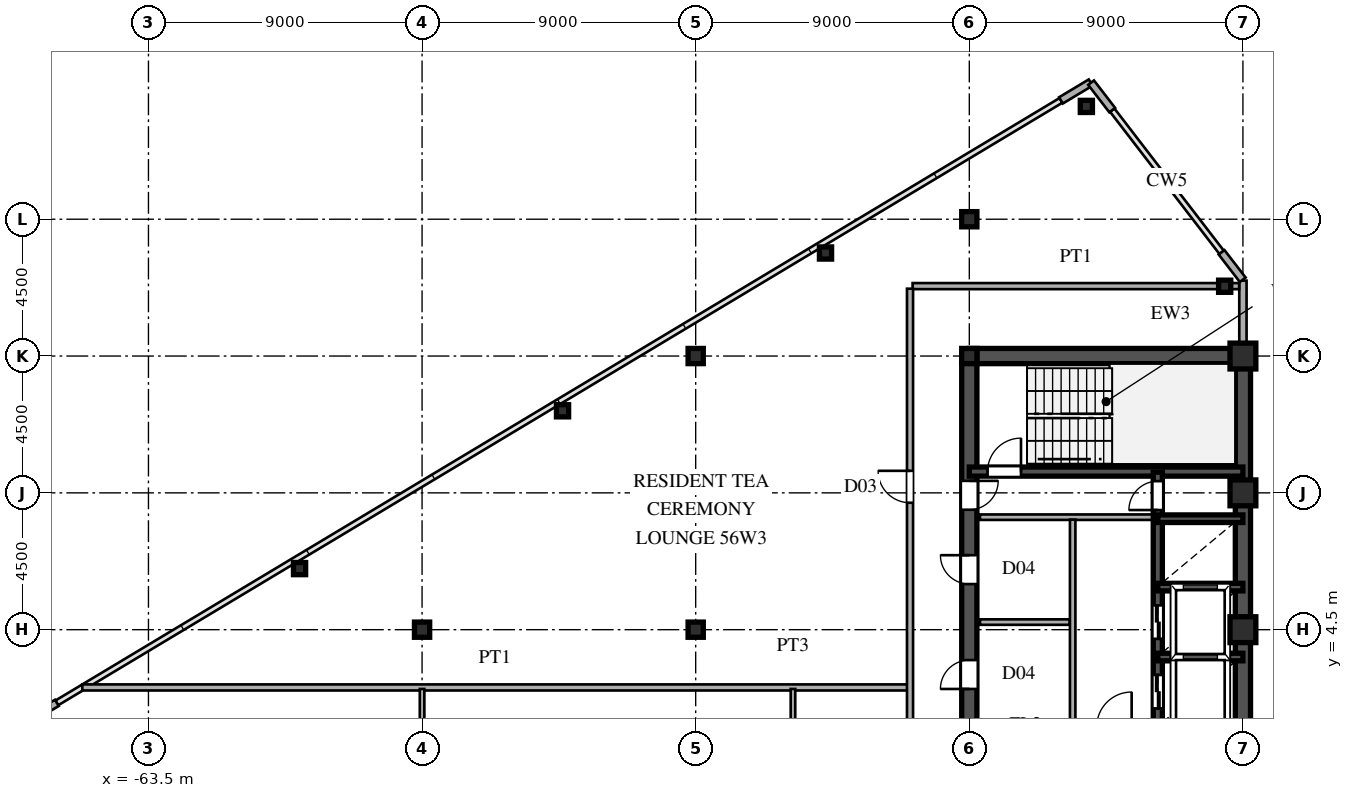
"""IFC4 building model, lengths in metres.
Left out: names, types, materials, properties, quantities, classifications, styles, units other than length and angle.
Written with IfcOpenShell. Run it as: python <this file> out.ifc"""

import sys

from ifc_helpers import new_model, si_unit, direction, frame, frame_2d, origin, origin_2d, place, context, subcontext, project, spatial, rectangle, hollow_rectangle, i_section, extrude, source, transform, mapped, element, fill, save


model = new_model("IFC4")
c1 = context("Model", 3, precision=1e-05, world=origin(), true_north=direction((0.0, 1.0)))
c2 = subcontext(c1, "Body", "Model", "MODEL_VIEW")
j1 = project(units=[si_unit("LENGTHUNIT", "METRE"), si_unit("PLANEANGLEUNIT", "RADIAN")], contexts=[c1])
p1 = place(None, origin())
s1 = spatial("IfcSite", under=j1, at=p1, CompositionType="ELEMENT")
p2 = place(p1, origin())
s2 = spatial("IfcBuilding", under=s1, at=p2, CompositionType="ELEMENT")
p3 = place(p2, frame((0.0, 0.0, 210.3)))
s3 = spatial("IfcBuildingStorey", under=s2, at=p3, CompositionType="ELEMENT", Elevation=210.3)
m1 = source(origin(), c2, "Body", "SweptSolid", [
    extrude(hollow_rectangle(XDim=0.85, YDim=0.85, WallThickness=0.036, at=origin_2d()), origin(), (0.0, 0.0, 1.0), 3.6),
])
for number, where, z_axis, x_axis in (
    (1, (-27.5, 4.5, 0.0), (0.0, 0.0, 1.0), (1.0, 0.0, 0.0)),
    (2, (-27.5, 9.0, 0.0), (0.0, 0.0, 1.0), (1.0, 0.0, 0.0)),
    (3, (-27.5, 13.5, 0.0), (0.0, 0.0, 1.0), (1.0, 0.0, 0.0)),
):
    element("IfcColumn", number, at=place(p3, frame(where, z_axis=z_axis, x_axis=x_axis)), inside=s3, PredefinedType="COLUMN", context=c2, shape_type="MappedRepresentation", body=[
        mapped(m1, transform((0.0, 0.0, 0.0), scale=1.0)),
    ])
m2 = source(origin(), c2, "Body", "SweptSolid", [
    extrude(i_section(OverallWidth=0.5, OverallDepth=0.5, WebThickness=0.02, FlangeThickness=0.032, at=origin_2d()), origin(), (0.0, 0.0, 1.0), 3.6),
])
for number, where, z_axis, x_axis in (
    (4, (-36.5, 13.5, 0.0), (0.0, 0.0, 1.0), (1.0, 0.0, 0.0)),
    (5, (-36.5, 18.0, 0.0), (0.0, 0.0, 1.0), (1.0, 0.0, 0.0)),
    (6, (-45.5, 4.5, 0.0), (0.0, 0.0, 1.0), (1.0, 0.0, 0.0)),
    (7, (-45.5, 13.5, 0.0), (0.0, 0.0, 1.0), (1.0, 0.0, 0.0)),
    (8, (-54.5, 4.5, 0.0), (0.0, 0.0, 1.0), (1.0, 0.0, 0.0)),
):
    element("IfcColumn", number, at=place(p3, frame(where, z_axis=z_axis, x_axis=x_axis)), inside=s3, PredefinedType="COLUMN", context=c2, shape_type="MappedRepresentation", body=[
        mapped(m2, transform((0.0, 0.0, 0.0), scale=1.0)),
    ])
m3 = source(origin(), c2, "Body", "SweptSolid", [
    extrude(hollow_rectangle(XDim=0.4, YDim=0.4, WallThickness=0.016, at=origin_2d()), origin(), (0.0, 0.0, 1.0), 3.6),
])
for number, where, z_axis, x_axis in (
    (9, (-28.1, 15.796, 0.0), (0.0, 0.0, 1.0), (1.0, 0.0, 0.0)),
    (10, (-32.65, 21.71, 0.0), (0.0, 0.0, 1.0), (1.0, 0.0, 0.0)),
    (11, (-41.23, 16.889, 0.0), (0.0, 0.0, 1.0), (1.0, 0.0, 0.0)),
    (12, (-49.88, 11.699, 0.0), (0.0, 0.0, 1.0), (1.0, 0.0, 0.0)),
    (13, (-58.53, 6.509, 0.0), (0.0, 0.0, 1.0), (1.0, 0.0, 0.0)),
):
    element("IfcColumn", number, at=place(p3, frame(where, z_axis=z_axis, x_axis=x_axis)), inside=s3, PredefinedType="COLUMN", context=c2, shape_type="MappedRepresentation", body=[
        mapped(m3, transform((0.0, 0.0, 0.0), scale=1.0)),
    ])
p4 = place(p3, frame((-27.5, 13.755, 0.0), z_axis=(0.0, 0.0, 1.0), x_axis=(0.0, 1.0, 0.0)))
e14 = element("IfcWall", 14, at=p4, inside=s3, PredefinedType="SOLIDWALL", context=c2, shape_type="SweptSolid", body=[
    extrude(rectangle(XDim=0.62, YDim=0.24, at=frame_2d((0.31, 0.0))), origin(), (0.0, 0.0, 1.0), 2.88),
])
p5 = place(p3, frame((-27.5, 14.375, 0.0), z_axis=(0.0, 0.0, 1.0), x_axis=(0.0, 1.0, 0.0)))
e15 = element("IfcWall", 15, at=p5, inside=s3, PredefinedType="SOLIDWALL", context=c2, shape_type="SweptSolid", body=[
    extrude(rectangle(XDim=1.605, YDim=0.24, at=frame_2d((0.803, 0.0))), origin(), (0.0, 0.0, 1.0), 3.38),
])
for number, where, z_axis, x_axis in (
    (16, (-27.506, 16.008, 0.0), (0.0, 0.0, 1.0), (-0.61, 0.793, 0.0)),
    (17, (-31.799, 21.588, 0.0), (0.0, 0.0, 1.0), (-0.61, 0.793, 0.0)),
    (18, (-32.509, 22.495, 0.0), (0.0, 0.0, 1.0), (-0.857, -0.515, 0.0)),
    (19, (-66.514, 2.092, 0.0), (0.0, 0.0, 1.0), (-0.857, -0.515, 0.0)),
):
    element("IfcWall", number, at=place(p3, frame(where, z_axis=z_axis, x_axis=x_axis)), inside=s3, PredefinedType="SOLIDWALL", context=c2, shape_type="SweptSolid", body=[
        extrude(rectangle(XDim=1.14, YDim=0.24, at=frame_2d((0.57, 0.0))), origin(), (0.0, 0.0, 1.0), 3.38),
    ])
p6 = place(p3, frame((-27.5, 1.3, 0.0), z_axis=(0.0, 0.0, 1.0), x_axis=(0.0, 1.0, 0.0)))
e20 = element("IfcWall", 20, at=p6, inside=s3, PredefinedType="SHEAR", context=c2, shape_type="SweptSolid", body=[
    extrude(rectangle(XDim=12.2, YDim=0.5, at=frame_2d((6.1, 0.0))), origin(), (0.0, 0.0, 1.0), 3.38),
])
p7 = place(p3, frame((-36.5, 13.5, 0.0), z_axis=(0.0, 0.0, 1.0), x_axis=(1.0, 0.0, 0.0)))
e21 = element("IfcWall", 21, at=p7, inside=s3, PredefinedType="SHEAR", context=c2, shape_type="SweptSolid", body=[
    extrude(rectangle(XDim=9.0, YDim=0.5, at=frame_2d((4.5, 0.0))), origin(), (0.0, 0.0, 1.0), 3.38),
])
p8 = place(p3, frame((-36.5, 8.2, 0.0), z_axis=(0.0, 0.0, 1.0), x_axis=(0.0, 1.0, 0.0)))
e22 = element("IfcWall", 22, at=p8, inside=s3, PredefinedType="SHEAR", context=c2, shape_type="SweptSolid", body=[
    extrude(rectangle(XDim=5.45, YDim=0.5, at=frame_2d((2.725, 0.0))), origin(), (0.0, 0.0, 1.0), 3.38),
])
p9 = place(p8, frame((0.245, 0.0, 0.0)))
e23 = element("IfcOpeningElement", 23, at=p9, cuts=e22, PredefinedType="OPENING", context=c2, shape_type="SweptSolid", body=[
    extrude(rectangle(XDim=0.95, YDim=2.15, at=frame_2d((0.475, 1.075))), frame((0.0, 0.26, 0.0), z_axis=(0.0, -1.0, 0.0), x_axis=(1.0, 0.0, 0.0)), (0.0, 0.0, 1.0), 0.52),
])
p10 = place(p3, frame((-36.5, 1.3, 0.0), z_axis=(0.0, 0.0, 1.0), x_axis=(0.0, 1.0, 0.0)))
e24 = element("IfcWall", 24, at=p10, inside=s3, PredefinedType="SHEAR", context=c2, shape_type="SweptSolid", body=[
    extrude(rectangle(XDim=3.45, YDim=0.5, at=frame_2d((1.725, 0.0))), origin(), (0.0, 0.0, 1.0), 3.38),
])
p11 = place(p10, frame((1.25, 0.0, 0.0)))
e25 = element("IfcOpeningElement", 25, at=p11, cuts=e24, PredefinedType="OPENING", context=c2, shape_type="SweptSolid", body=[
    extrude(rectangle(XDim=0.95, YDim=2.15, at=frame_2d((0.475, 1.075))), frame((0.0, 0.26, 0.0), z_axis=(0.0, -1.0, 0.0), x_axis=(1.0, 0.0, 0.0)), (0.0, 0.0, 1.0), 0.52),
])
p12 = place(p3, frame((-36.5, 4.75, 0.0), z_axis=(0.0, 0.0, 1.0), x_axis=(0.0, 1.0, 0.0)))
e26 = element("IfcWall", 26, at=p12, inside=s3, PredefinedType="SHEAR", context=c2, shape_type="SweptSolid", body=[
    extrude(rectangle(XDim=3.45, YDim=0.5, at=frame_2d((1.725, 0.0))), origin(), (0.0, 0.0, 1.0), 3.38),
])
p13 = place(p12, frame((1.25, 0.0, 0.0)))
e27 = element("IfcOpeningElement", 27, at=p13, cuts=e26, PredefinedType="OPENING", context=c2, shape_type="SweptSolid", body=[
    extrude(rectangle(XDim=0.95, YDim=2.15, at=frame_2d((0.475, 1.075))), frame((0.0, 0.26, 0.0), z_axis=(0.0, -1.0, 0.0), x_axis=(1.0, 0.0, 0.0)), (0.0, 0.0, 1.0), 0.52),
])
p14 = place(p3, frame((-36.5, 9.7, 0.0), z_axis=(0.0, 0.0, 1.0), x_axis=(1.0, 0.0, 0.0)))
e28 = element("IfcWall", 28, at=p14, inside=s3, PredefinedType="SHEAR", context=c2, shape_type="SweptSolid", body=[
    extrude(rectangle(XDim=9.0, YDim=0.3, at=frame_2d((4.5, 0.0))), origin(), (0.0, 0.0, 1.0), 3.38),
])
p15 = place(p14, frame((0.6, 0.0, 0.0)))
e29 = element("IfcOpeningElement", 29, at=p15, cuts=e28, PredefinedType="OPENING", context=c2, shape_type="SweptSolid", body=[
    extrude(rectangle(XDim=1.1, YDim=2.2, at=frame_2d((0.55, 1.1))), frame((0.0, 0.16, 0.0), z_axis=(0.0, -1.0, 0.0), x_axis=(1.0, 0.0, 0.0)), (0.0, 0.0, 1.0), 0.32),
])
for number, where, z_axis, x_axis in (
    (30, (-30.3, 3.6, 0.0), (0.0, 0.0, 1.0), (1.0, 0.0, 0.0)),
    (31, (-30.3, 5.9, 0.0), (0.0, 0.0, 1.0), (1.0, 0.0, 0.0)),
    (32, (-30.3, 8.15, 0.0), (0.0, 0.0, 1.0), (1.0, 0.0, 0.0)),
):
    element("IfcWall", number, at=place(p3, frame(where, z_axis=z_axis, x_axis=x_axis)), inside=s3, PredefinedType="SHEAR", context=c2, shape_type="SweptSolid", body=[
        extrude(rectangle(XDim=2.8, YDim=0.25, at=frame_2d((1.4, 0.0))), origin(), (0.0, 0.0, 1.0), 3.38),
    ])
p16 = place(p3, frame((-30.3, 1.32, 0.0), z_axis=(0.0, 0.0, 1.0), x_axis=(0.0, 1.0, 0.0)))
e33 = element("IfcWall", 33, at=p16, inside=s3, PredefinedType="SHEAR", context=c2, shape_type="SweptSolid", body=[
    extrude(rectangle(XDim=2.28, YDim=0.3, at=frame_2d((1.14, 0.0))), origin(), (0.0, 0.0, 1.0), 3.38),
])
p17 = place(p16, frame((0.59, 0.0, 0.0)))
e34 = element("IfcOpeningElement", 34, at=p17, cuts=e33, PredefinedType="OPENING", context=c2, shape_type="SweptSolid", body=[
    extrude(rectangle(XDim=1.1, YDim=2.2, at=frame_2d((0.55, 1.1))), frame((0.0, 0.16, 0.0), z_axis=(0.0, -1.0, 0.0), x_axis=(1.0, 0.0, 0.0)), (0.0, 0.0, 1.0), 0.32),
])
p18 = place(p3, frame((-30.3, 3.6, 0.0), z_axis=(0.0, 0.0, 1.0), x_axis=(0.0, 1.0, 0.0)))
e35 = element("IfcWall", 35, at=p18, inside=s3, PredefinedType="SHEAR", context=c2, shape_type="SweptSolid", body=[
    extrude(rectangle(XDim=2.3, YDim=0.3, at=frame_2d((1.15, 0.0))), origin(), (0.0, 0.0, 1.0), 3.38),
])
p19 = place(p18, frame((0.6, 0.0, 0.0)))
e36 = element("IfcOpeningElement", 36, at=p19, cuts=e35, PredefinedType="OPENING", context=c2, shape_type="SweptSolid", body=[
    extrude(rectangle(XDim=1.1, YDim=2.2, at=frame_2d((0.55, 1.1))), frame((0.0, 0.16, 0.0), z_axis=(0.0, -1.0, 0.0), x_axis=(1.0, 0.0, 0.0)), (0.0, 0.0, 1.0), 0.32),
])
p20 = place(p3, frame((-30.3, 5.9, 0.0), z_axis=(0.0, 0.0, 1.0), x_axis=(0.0, 1.0, 0.0)))
e37 = element("IfcWall", 37, at=p20, inside=s3, PredefinedType="SHEAR", context=c2, shape_type="SweptSolid", body=[
    extrude(rectangle(XDim=2.25, YDim=0.3, at=frame_2d((1.125, 0.0))), origin(), (0.0, 0.0, 1.0), 3.38),
])
p21 = place(p3, frame((-30.3, 8.15, 0.0), z_axis=(0.0, 0.0, 1.0), x_axis=(0.0, 1.0, 0.0)))
e38 = element("IfcWall", 38, at=p21, inside=s3, PredefinedType="SHEAR", context=c2, shape_type="SweptSolid", body=[
    extrude(rectangle(XDim=1.53, YDim=0.3, at=frame_2d((0.765, 0.0))), origin(), (0.0, 0.0, 1.0), 3.38),
])
p22 = place(p21, frame((0.285, 0.0, 0.0)))
e39 = element("IfcOpeningElement", 39, at=p22, cuts=e38, PredefinedType="OPENING", context=c2, shape_type="SweptSolid", body=[
    extrude(rectangle(XDim=0.95, YDim=2.15, at=frame_2d((0.475, 1.075))), frame((0.0, 0.16, 0.0), z_axis=(0.0, -1.0, 0.0), x_axis=(1.0, 0.0, 0.0)), (0.0, 0.0, 1.0), 0.32),
])
p23 = place(p3, frame((-36.15, 8.2, 0.0), z_axis=(0.0, 0.0, 1.0), x_axis=(1.0, 0.0, 0.0)))
e40 = element("IfcWall", 40, at=p23, inside=s3, PredefinedType="PARTITIONING", context=c2, shape_type="SweptSolid", body=[
    extrude(rectangle(XDim=5.7, YDim=0.18, at=frame_2d((2.85, 0.0))), origin(), (0.0, 0.0, 1.0), 3.38),
])
p24 = place(p3, frame((-33.1, 1.38, 0.0), z_axis=(0.0, 0.0, 1.0), x_axis=(0.0, 1.0, 0.0)))
e41 = element("IfcWall", 41, at=p24, inside=s3, PredefinedType="PARTITIONING", context=c2, shape_type="SweptSolid", body=[
    extrude(rectangle(XDim=6.74, YDim=0.18, at=frame_2d((3.37, 0.0))), origin(), (0.0, 0.0, 1.0), 3.38),
])
p25 = place(p3, frame((-36.15, 4.75, 0.0), z_axis=(0.0, 0.0, 1.0), x_axis=(1.0, 0.0, 0.0)))
e42 = element("IfcWall", 42, at=p25, inside=s3, PredefinedType="PARTITIONING", context=c2, shape_type="SweptSolid", body=[
    extrude(rectangle(XDim=2.95, YDim=0.18, at=frame_2d((1.475, 0.0))), origin(), (0.0, 0.0, 1.0), 3.38),
])
p26 = place(p3, frame((-65.676, 2.6, 0.0), z_axis=(0.0, 0.0, 1.0), x_axis=(1.0, 0.0, 0.0)))
e43 = element("IfcWall", 43, at=p26, inside=s3, PredefinedType="PARTITIONING", context=c2, shape_type="SweptSolid", body=[
    extrude(rectangle(XDim=27.146, YDim=0.2, at=frame_2d((13.573, 0.0))), origin(), (0.0, 0.0, 1.0), 3.38),
])
p27 = place(p3, frame((-38.365, 15.8, 0.0), z_axis=(0.0, 0.0, 1.0), x_axis=(1.0, 0.0, 0.0)))
e44 = element("IfcWall", 44, at=p27, inside=s3, PredefinedType="PARTITIONING", context=c2, shape_type="SweptSolid", body=[
    extrude(rectangle(XDim=10.74, YDim=0.2, at=frame_2d((5.37, 0.0))), origin(), (0.0, 0.0, 1.0), 3.38),
])
p28 = place(p3, frame((-54.5, -9.335, 0.0), z_axis=(0.0, 0.0, 1.0), x_axis=(0.0, 1.0, 0.0)))
e45 = element("IfcWall", 45, at=p28, inside=s3, PredefinedType="PARTITIONING", context=c2, shape_type="SweptSolid", body=[
    extrude(rectangle(XDim=11.885, YDim=0.15, at=frame_2d((5.942, 0.0))), origin(), (0.0, 0.0, 1.0), 2.78),
])
p29 = place(p28, frame((5.16, 0.0, 0.0)))
e46 = element("IfcOpeningElement", 46, at=p29, cuts=e45, PredefinedType="OPENING", context=c2, shape_type="SweptSolid", body=[
    extrude(rectangle(XDim=0.95, YDim=2.15, at=frame_2d((0.475, 1.075))), frame((0.0, 0.085, 0.0), z_axis=(0.0, -1.0, 0.0), x_axis=(1.0, 0.0, 0.0)), (0.0, 0.0, 1.0), 0.17),
])
p30 = place(p3, frame((-42.3, -1.128, 0.0), z_axis=(0.0, 0.0, 1.0), x_axis=(0.0, 1.0, 0.0)))
e47 = element("IfcWall", 47, at=p30, inside=s3, PredefinedType="PARTITIONING", context=c2, shape_type="SweptSolid", body=[
    extrude(rectangle(XDim=3.678, YDim=0.15, at=frame_2d((1.839, 0.0))), origin(), (0.0, 0.0, 1.0), 3.38),
])
p31 = place(p3, frame((-38.45, -15.715, 0.0), z_axis=(0.0, 0.0, 1.0), x_axis=(0.0, 1.0, 0.0)))
e48 = element("IfcWall", 48, at=p31, inside=s3, PredefinedType="PARTITIONING", context=c2, shape_type="SweptSolid", body=[
    extrude(rectangle(XDim=31.43, YDim=0.2, at=frame_2d((15.715, 0.0))), origin(), (0.0, 0.0, 1.0), 3.38),
])
p32 = place(p31, frame((2.29, 0.0, 0.0)))
e49 = element("IfcOpeningElement", 49, at=p32, cuts=e48, PredefinedType="OPENING", context=c2, shape_type="SweptSolid", body=[
    extrude(rectangle(XDim=1.05, YDim=2.25, at=frame_2d((0.525, 1.125))), frame((0.0, 0.11, 0.0), z_axis=(0.0, -1.0, 0.0), x_axis=(1.0, 0.0, 0.0)), (0.0, 0.0, 1.0), 0.22),
])
p33 = place(p31, frame((11.301, 0.0, 0.0)))
e50 = element("IfcOpeningElement", 50, at=p33, cuts=e48, PredefinedType="OPENING", context=c2, shape_type="SweptSolid", body=[
    extrude(rectangle(XDim=1.05, YDim=2.25, at=frame_2d((0.525, 1.125))), frame((0.0, 0.11, 0.0), z_axis=(0.0, -1.0, 0.0), x_axis=(1.0, 0.0, 0.0)), (0.0, 0.0, 1.0), 0.22),
])
p34 = place(p31, frame((24.39, 0.0, 0.0)))
e51 = element("IfcOpeningElement", 51, at=p34, cuts=e48, PredefinedType="OPENING", context=c2, shape_type="SweptSolid", body=[
    extrude(rectangle(XDim=1.05, YDim=2.25, at=frame_2d((0.525, 1.125))), frame((0.0, 0.11, 0.0), z_axis=(0.0, -1.0, 0.0), x_axis=(1.0, 0.0, 0.0)), (0.0, 0.0, 1.0), 0.22),
])
m4 = source(origin(), c2, "Body", "SweptSolid", [
    extrude(rectangle(XDim=0.95, YDim=2.15, at=frame_2d((0.475, 1.075))), frame((0.0, 0.025, 0.0), z_axis=(0.0, -1.0, 0.0), x_axis=(1.0, 0.0, 0.0)), (0.0, 0.0, 1.0), 0.05),
])
p35 = place(p9, frame((0.95, 0.0, 0.0), z_axis=(0.0, 0.0, 1.0), x_axis=(-1.0, 0.0, 0.0)))
e52 = element("IfcDoor", 52, at=p35, inside=s3, OperationType="SINGLE_SWING_RIGHT", PredefinedType="DOOR", context=c2, shape_type="MappedRepresentation", body=[
    mapped(m4, transform((0.0, 0.0, 0.0), scale=1.0)),
])
fill(e23, e52)
p36 = place(p11, origin())
e53 = element("IfcDoor", 53, at=p36, inside=s3, OperationType="SINGLE_SWING_LEFT", PredefinedType="DOOR", context=c2, shape_type="MappedRepresentation", body=[
    mapped(m4, transform((0.0, 0.0, 0.0), scale=1.0)),
])
fill(e25, e53)
p37 = place(p13, origin())
e54 = element("IfcDoor", 54, at=p37, inside=s3, OperationType="SINGLE_SWING_RIGHT", PredefinedType="DOOR", context=c2, shape_type="MappedRepresentation", body=[
    mapped(m4, transform((0.0, 0.0, 0.0), scale=1.0)),
])
fill(e27, e54)
m5 = source(origin(), c2, "Body", "SweptSolid", [
    extrude(rectangle(XDim=1.1, YDim=2.2, at=frame_2d((0.55, 1.1))), frame((0.0, 0.025, 0.0), z_axis=(0.0, -1.0, 0.0), x_axis=(1.0, 0.0, 0.0)), (0.0, 0.0, 1.0), 0.05),
])
p38 = place(p15, origin())
e55 = element("IfcDoor", 55, at=p38, inside=s3, OperationType="SINGLE_SWING_RIGHT", PredefinedType="DOOR", context=c2, shape_type="MappedRepresentation", body=[
    mapped(m5, transform((0.0, 0.0, 0.0), scale=1.0)),
])
fill(e29, e55)
m6 = source(origin(), c2, "Body", "SweptSolid", [
    extrude(rectangle(XDim=1.1, YDim=2.2, at=frame_2d((0.55, 1.1))), frame((0.0, 0.025, 0.0), z_axis=(0.0, -1.0, 0.0), x_axis=(1.0, 0.0, 0.0)), (0.0, 0.0, 1.0), 0.05),
])
p39 = place(p17, origin())
e56 = element("IfcDoor", 56, at=p39, inside=s3, OperationType="DOUBLE_DOOR_SLIDING", PredefinedType="DOOR", context=c2, shape_type="MappedRepresentation", body=[
    mapped(m6, transform((0.0, 0.0, 0.0), scale=1.0)),
])
fill(e34, e56)
p40 = place(p19, origin())
e57 = element("IfcDoor", 57, at=p40, inside=s3, OperationType="DOUBLE_DOOR_SLIDING", PredefinedType="DOOR", context=c2, shape_type="MappedRepresentation", body=[
    mapped(m6, transform((0.0, 0.0, 0.0), scale=1.0)),
])
fill(e36, e57)
p41 = place(p22, origin())
e58 = element("IfcDoor", 58, at=p41, inside=s3, OperationType="SINGLE_SWING_LEFT", PredefinedType="DOOR", context=c2, shape_type="MappedRepresentation", body=[
    mapped(m4, transform((0.0, 0.0, 0.0), scale=1.0)),
])
fill(e39, e58)
m7 = source(origin(), c2, "Body", "SweptSolid", [
    extrude(rectangle(XDim=1.05, YDim=2.25, at=frame_2d((0.525, 1.125))), frame((0.0, 0.025, 0.0), z_axis=(0.0, -1.0, 0.0), x_axis=(1.0, 0.0, 0.0)), (0.0, 0.0, 1.0), 0.05),
])
p42 = place(p34, origin())
e59 = element("IfcDoor", 59, at=p42, inside=s3, OperationType="SINGLE_SWING_RIGHT", PredefinedType="DOOR", context=c2, shape_type="MappedRepresentation", body=[
    mapped(m7, transform((0.0, 0.0, 0.0), scale=1.0)),
])
fill(e51, e59)
save(model, sys.argv[1])
